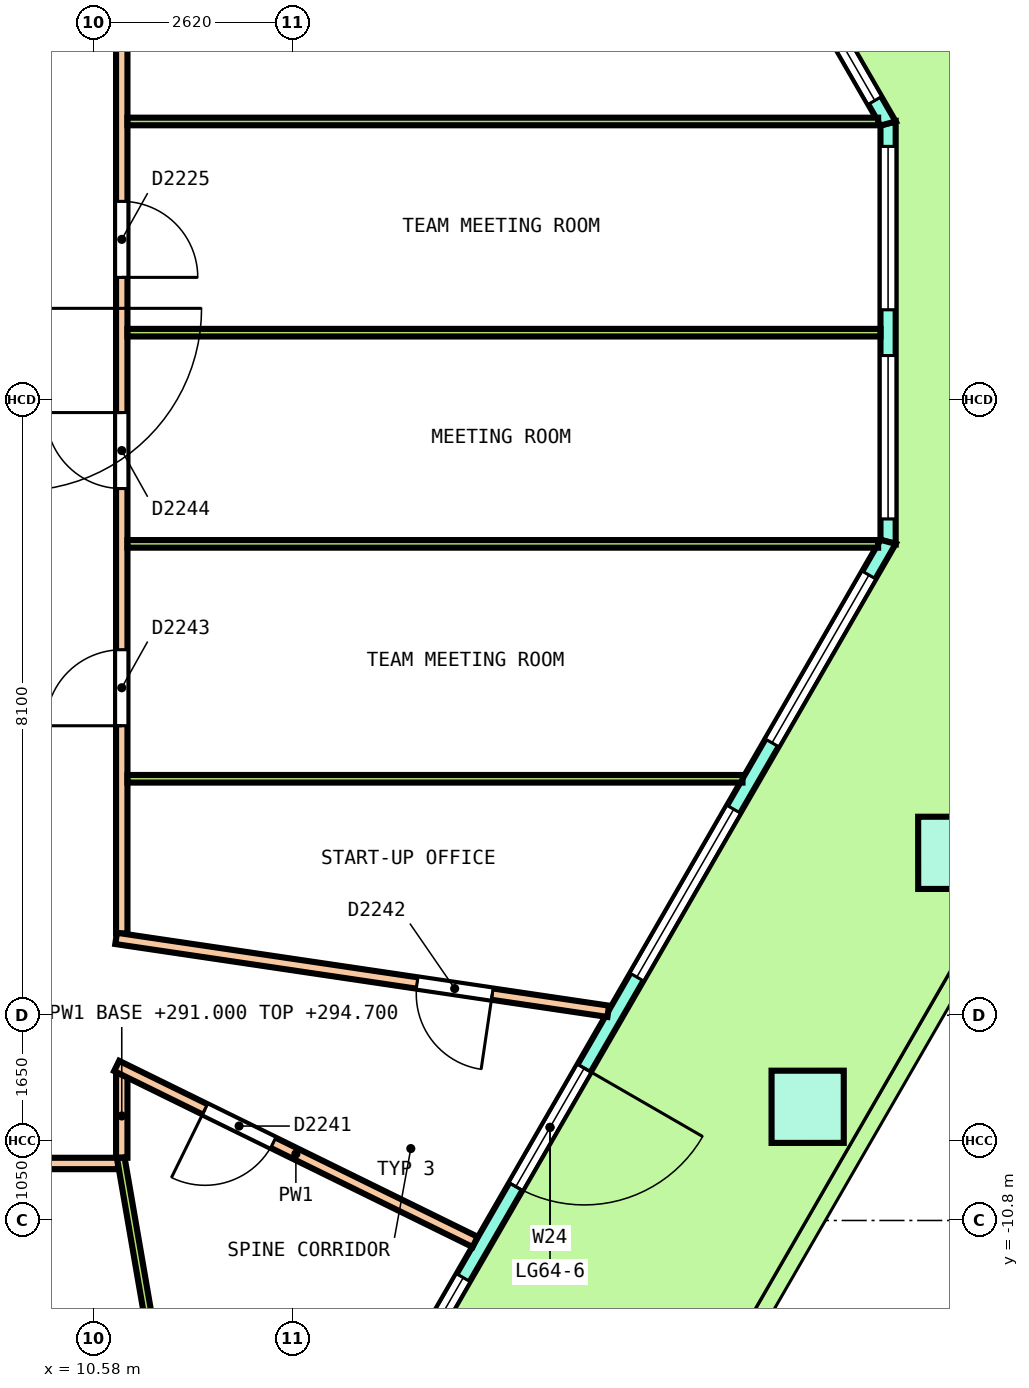
"""IFC4 building model, lengths in metres.
Left out: names, types, materials, properties, quantities, classifications, styles, units other than length and angle.
Written with IfcOpenShell. Run it as: python <this file> out.ifc"""

import sys

from ifc_helpers import new_model, si_unit, direction, frame, frame_2d, origin, origin_2d, place, context, subcontext, project, spatial, polyline, rectangle, outline, extrude, element, fill, save


model = new_model("IFC4")
c1 = context("Model", 3, precision=1e-05, world=origin(), true_north=direction((0.0, 1.0)))
c2 = subcontext(c1, "Body", "Model", "MODEL_VIEW")
j1 = project(units=[si_unit("LENGTHUNIT", "METRE"), si_unit("PLANEANGLEUNIT", "RADIAN")], contexts=[c1])
p1 = place(None, origin())
s1 = spatial("IfcSite", under=j1, at=p1, CompositionType="ELEMENT")
p2 = place(p1, origin())
s2 = spatial("IfcBuilding", under=s1, at=p2, CompositionType="ELEMENT")
p3 = place(p2, frame((0.0, 0.0, 291.0)))
s3 = spatial("IfcBuildingStorey", under=s2, at=p3, CompositionType="ELEMENT", Elevation=291.0)
p4 = place(p3, frame((19.974, -9.304, 0.0), z_axis=(0.003611945175, 0.00628746012, 0.999973710503), x_axis=(0.497890394796, 0.867209649664, -0.007251089524)))
e1 = element("IfcColumn", 1, at=p4, inside=s3, PredefinedType="COLUMN", context=c2, shape_type="SweptSolid", body=[
    extrude(rectangle(XDim=0.95, YDim=0.95, at=origin_2d()), origin(), (0.0, 0.0, 1.0), 3.65),
])
p5 = place(p3, frame((21.903, -5.963, 0.0), z_axis=(0.010900423214, 0.018858400897, 0.999762742599), x_axis=(0.499728924135, 0.865907930491, -0.021782063614)))
e2 = element("IfcColumn", 2, at=p5, inside=s3, PredefinedType="COLUMN", context=c2, shape_type="SweptSolid", body=[
    extrude(rectangle(XDim=0.95, YDim=0.95, at=origin_2d()), origin(), (0.0, 0.0, 1.0), 3.651),
])
p6 = place(p3, frame((21.032, -1.872, 0.0), z_axis=(0.0, 0.0, 1.0), x_axis=(0.0, 1.0, 0.0)))
e3 = element("IfcWall", 3, at=p6, inside=s3, PredefinedType="SOLIDWALL", context=c2, shape_type="SweptSolid", body=[
    extrude(outline(polyline([(-0.027, -0.1), (1.084, -0.1), (2.196, -0.1), (3.307, -0.1), (4.419, -0.1), (5.53, -0.1), (5.477, 0.1), (4.387, 0.1), (3.297, 0.1), (2.207, 0.1), (1.117, 0.1), (0.027, 0.1), (-0.027, -0.1)])), origin(), (0.0, 0.0, 1.0), 3.7),
])
p7 = place(p6, frame((0.301, 0.0, 0.1)))
e4 = element("IfcOpeningElement", 4, at=p7, cuts=e3, PredefinedType="OPENING", context=c2, shape_type="SweptSolid", body=[
    extrude(rectangle(XDim=2.15, YDim=2.75, at=frame_2d((1.075, 1.375))), frame((0.0, 0.11, 0.0), z_axis=(0.0, -1.0, 0.0), x_axis=(1.0, 0.0, 0.0)), (0.0, 0.0, 1.0), 0.22),
])
p8 = place(p6, frame((3.052, 0.0, 0.1)))
e5 = element("IfcOpeningElement", 5, at=p8, cuts=e3, PredefinedType="OPENING", context=c2, shape_type="SweptSolid", body=[
    extrude(rectangle(XDim=2.15, YDim=2.75, at=frame_2d((1.075, 1.375))), frame((0.0, 0.11, 0.0), z_axis=(0.0, -1.0, 0.0), x_axis=(1.0, 0.0, 0.0)), (0.0, 0.0, 1.0), 0.22),
])
p9 = place(p3, frame((21.032, 3.632, 0.0), z_axis=(0.0, 0.0, 1.0), x_axis=(-0.50000248076, 0.866023971512, 0.0)))
e6 = element("IfcWall", 6, at=p9, inside=s3, PredefinedType="SOLIDWALL", context=c2, shape_type="SweptSolid", body=[
    extrude(outline(polyline([(-0.027, -0.1), (1.03, -0.1), (2.087, -0.1), (3.144, -0.1), (4.2, -0.1), (5.257, -0.1), (6.314, -0.1), (7.371, -0.1), (8.428, -0.1), (9.484, -0.1), (10.541, -0.1), (11.598, -0.1), (12.655, -0.1), (13.712, -0.1), (14.769, -0.1), (14.715, 0.1), (13.666, 0.1), (12.616, 0.1), (11.567, 0.1), (10.518, 0.1), (9.469, 0.1), (8.42, 0.1), (7.371, 0.1), (6.322, 0.1), (5.272, 0.1), (4.223, 0.1), (3.174, 0.1), (2.125, 0.1), (1.076, 0.1), (0.027, 0.1), (-0.027, -0.1)])), origin(), (0.0, 0.0, 1.0), 3.7),
])
p10 = place(p9, frame((0.349, 0.0, 0.1)))
e7 = element("IfcOpeningElement", 7, at=p10, cuts=e6, PredefinedType="OPENING", context=c2, shape_type="SweptSolid", body=[
    extrude(rectangle(XDim=2.25, YDim=2.75, at=frame_2d((1.125, 1.375))), frame((0.0, 0.11, 0.0), z_axis=(0.0, -1.0, 0.0), x_axis=(1.0, 0.0, 0.0)), (0.0, 0.0, 1.0), 0.22),
])
p11 = place(p9, frame((3.298, 0.0, 0.1)))
e8 = element("IfcOpeningElement", 8, at=p11, cuts=e6, PredefinedType="OPENING", context=c2, shape_type="SweptSolid", body=[
    extrude(rectangle(XDim=2.25, YDim=2.75, at=frame_2d((1.125, 1.375))), frame((0.0, 0.11, 0.0), z_axis=(0.0, -1.0, 0.0), x_axis=(1.0, 0.0, 0.0)), (0.0, 0.0, 1.0), 0.22),
])
p12 = place(p9, frame((6.471, 0.0, 0.0)))
e9 = element("IfcOpeningElement", 9, at=p12, cuts=e6, PredefinedType="OPENING", context=c2, shape_type="SweptSolid", body=[
    extrude(rectangle(XDim=1.8, YDim=2.4, at=frame_2d((0.9, 1.2))), frame((0.0, 0.11, 0.0), z_axis=(0.0, -1.0, 0.0), x_axis=(1.0, 0.0, 0.0)), (0.0, 0.0, 1.0), 0.22),
])
p13 = place(p9, frame((6.471, 0.0, 2.55)))
e10 = element("IfcOpeningElement", 10, at=p13, cuts=e6, PredefinedType="OPENING", context=c2, shape_type="SweptSolid", body=[
    extrude(rectangle(XDim=1.8, YDim=0.3, at=frame_2d((0.9, 0.15))), frame((0.0, 0.11, 0.0), z_axis=(0.0, -1.0, 0.0), x_axis=(1.0, 0.0, 0.0)), (0.0, 0.0, 1.0), 0.22),
])
p14 = place(p9, frame((9.194, 0.0, 0.1)))
e11 = element("IfcOpeningElement", 11, at=p14, cuts=e6, PredefinedType="OPENING", context=c2, shape_type="SweptSolid", body=[
    extrude(rectangle(XDim=2.25, YDim=2.75, at=frame_2d((1.125, 1.375))), frame((0.0, 0.11, 0.0), z_axis=(0.0, -1.0, 0.0), x_axis=(1.0, 0.0, 0.0)), (0.0, 0.0, 1.0), 0.22),
])
p15 = place(p9, frame((12.143, 0.0, 0.1)))
e12 = element("IfcOpeningElement", 12, at=p15, cuts=e6, PredefinedType="OPENING", context=c2, shape_type="SweptSolid", body=[
    extrude(rectangle(XDim=2.25, YDim=2.75, at=frame_2d((1.125, 1.375))), frame((0.0, 0.11, 0.0), z_axis=(0.0, -1.0, 0.0), x_axis=(1.0, 0.0, 0.0)), (0.0, 0.0, 1.0), 0.22),
])
p16 = place(p3, frame((12.137, -17.278, 0.0), z_axis=(0.0, 0.0, 1.0), x_axis=(0.499992911004, 0.86602949658, 0.0)))
e13 = element("IfcWall", 13, at=p16, inside=s3, PredefinedType="SOLIDWALL", context=c2, shape_type="SweptSolid", body=[
    extrude(outline(polyline([(-0.027, -0.1), (1.023, -0.1), (2.072, -0.1), (3.122, -0.1), (4.172, -0.1), (5.221, -0.1), (6.271, -0.1), (7.321, -0.1), (8.37, -0.1), (9.42, -0.1), (10.469, -0.1), (11.519, -0.1), (12.569, -0.1), (13.618, -0.1), (14.668, -0.1), (15.718, -0.1), (16.767, -0.1), (17.817, -0.1), (17.763, 0.1), (16.72, 0.1), (15.676, 0.1), (14.633, 0.1), (13.59, 0.1), (12.546, 0.1), (11.503, 0.1), (10.46, 0.1), (9.417, 0.1), (8.373, 0.1), (7.33, 0.1), (6.287, 0.1), (5.243, 0.1), (4.2, 0.1), (3.157, 0.1), (2.114, 0.1), (1.07, 0.1), (0.027, 0.1), (-0.027, -0.1)])), origin(), (0.0, 0.0, 1.0), 3.7),
])
p17 = place(p16, frame((0.504, 0.0, 0.1)))
e14 = element("IfcOpeningElement", 14, at=p17, cuts=e13, PredefinedType="OPENING", context=c2, shape_type="SweptSolid", body=[
    extrude(rectangle(XDim=2.55, YDim=2.75, at=frame_2d((1.275, 1.375))), frame((0.0, 0.11, 0.0), z_axis=(0.0, -1.0, 0.0), x_axis=(1.0, 0.0, 0.0)), (0.0, 0.0, 1.0), 0.22),
])
p18 = place(p16, frame((4.062, 0.0, 0.1)))
e15 = element("IfcOpeningElement", 15, at=p18, cuts=e13, PredefinedType="OPENING", context=c2, shape_type="SweptSolid", body=[
    extrude(rectangle(XDim=2.55, YDim=2.75, at=frame_2d((1.275, 1.375))), frame((0.0, 0.11, 0.0), z_axis=(0.0, -1.0, 0.0), x_axis=(1.0, 0.0, 0.0)), (0.0, 0.0, 1.0), 0.22),
])
p19 = place(p16, frame((7.995, 0.0, 0.0)))
e16 = element("IfcOpeningElement", 16, at=p19, cuts=e13, PredefinedType="OPENING", context=c2, shape_type="SweptSolid", body=[
    extrude(rectangle(XDim=1.8, YDim=2.4, at=frame_2d((0.9, 1.2))), frame((0.0, 0.11, 0.0), z_axis=(0.0, -1.0, 0.0), x_axis=(1.0, 0.0, 0.0)), (0.0, 0.0, 1.0), 0.22),
])
p20 = place(p16, frame((7.995, 0.0, 2.55)))
e17 = element("IfcOpeningElement", 17, at=p20, cuts=e13, PredefinedType="OPENING", context=c2, shape_type="SweptSolid", body=[
    extrude(rectangle(XDim=1.8, YDim=0.3, at=frame_2d((0.9, 0.15))), frame((0.0, 0.11, 0.0), z_axis=(0.0, -1.0, 0.0), x_axis=(1.0, 0.0, 0.0)), (0.0, 0.0, 1.0), 0.22),
])
p21 = place(p16, frame((11.178, 0.0, 0.1)))
e18 = element("IfcOpeningElement", 18, at=p21, cuts=e13, PredefinedType="OPENING", context=c2, shape_type="SweptSolid", body=[
    extrude(rectangle(XDim=2.55, YDim=2.75, at=frame_2d((1.275, 1.375))), frame((0.0, 0.11, 0.0), z_axis=(0.0, -1.0, 0.0), x_axis=(1.0, 0.0, 0.0)), (0.0, 0.0, 1.0), 0.22),
])
p22 = place(p16, frame((14.736, 0.0, 0.1)))
e19 = element("IfcOpeningElement", 19, at=p22, cuts=e13, PredefinedType="OPENING", context=c2, shape_type="SweptSolid", body=[
    extrude(rectangle(XDim=2.55, YDim=2.75, at=frame_2d((1.275, 1.375))), frame((0.0, 0.11, 0.0), z_axis=(0.0, -1.0, 0.0), x_axis=(1.0, 0.0, 0.0)), (0.0, 0.0, 1.0), 0.22),
])
p23 = place(p3, frame((10.95, -9.975, 0.0), z_axis=(0.0, 0.0, 1.0), x_axis=(0.0, 1.0, 0.0)))
e20 = element("IfcWall", 20, at=p23, inside=s3, PredefinedType="PARTITIONING", context=c2, shape_type="SweptSolid", body=[
    extrude(rectangle(XDim=1.1, YDim=0.15, at=frame_2d((0.55, 0.0))), origin(), (0.0, 0.0, 1.0), 3.7),
])
p24 = place(p3, frame((10.95, -7.025, 0.0), z_axis=(0.0, 0.0, 1.0), x_axis=(0.0, 1.0, 0.0)))
e21 = element("IfcWall", 21, at=p24, inside=s3, PredefinedType="PARTITIONING", context=c2, shape_type="SweptSolid", body=[
    extrude(rectangle(XDim=17.0, YDim=0.15, at=frame_2d((8.5, 0.0))), origin(), (0.0, 0.0, 1.0), 2.9),
])
p25 = place(p24, frame((8.632, 0.0, 0.0)))
e22 = element("IfcOpeningElement", 22, at=p25, cuts=e21, PredefinedType="OPENING", context=c2, shape_type="SweptSolid", body=[
    extrude(rectangle(XDim=1.0, YDim=2.1, at=frame_2d((0.5, 1.05))), frame((0.0, 0.085, 0.0), z_axis=(0.0, -1.0, 0.0), x_axis=(1.0, 0.0, 0.0)), (0.0, 0.0, 1.0), 0.17),
])
p26 = place(p24, frame((12.605, 0.0, 0.0)))
e23 = element("IfcOpeningElement", 23, at=p26, cuts=e21, PredefinedType="OPENING", context=c2, shape_type="SweptSolid", body=[
    extrude(rectangle(XDim=1.2, YDim=2.1, at=frame_2d((0.6, 1.05))), frame((0.0, 0.085, 0.0), z_axis=(0.0, -1.0, 0.0), x_axis=(1.0, 0.0, 0.0)), (0.0, 0.0, 1.0), 0.17),
])
p27 = place(p24, frame((2.733, 0.0, 0.0)))
e24 = element("IfcOpeningElement", 24, at=p27, cuts=e21, PredefinedType="OPENING", context=c2, shape_type="SweptSolid", body=[
    extrude(rectangle(XDim=1.0, YDim=2.1, at=frame_2d((0.5, 1.05))), frame((0.0, 0.085, 0.0), z_axis=(0.0, -1.0, 0.0), x_axis=(1.0, 0.0, 0.0)), (0.0, 0.0, 1.0), 0.17),
])
p28 = place(p24, frame((5.854, 0.0, 0.0)))
e25 = element("IfcOpeningElement", 25, at=p28, cuts=e21, PredefinedType="OPENING", context=c2, shape_type="SweptSolid", body=[
    extrude(rectangle(XDim=1.0, YDim=2.1, at=frame_2d((0.5, 1.05))), frame((0.0, 0.085, 0.0), z_axis=(0.0, -1.0, 0.0), x_axis=(1.0, 0.0, 0.0)), (0.0, 0.0, 1.0), 0.17),
])
p29 = place(p3, frame((-10.9, -10.05, 0.0), z_axis=(0.0, 0.0, 1.0), x_axis=(1.0, 0.0, 0.0)))
e26 = element("IfcWall", 26, at=p29, inside=s3, PredefinedType="PARTITIONING", context=c2, shape_type="SweptSolid", body=[
    extrude(rectangle(XDim=21.8, YDim=0.15, at=frame_2d((10.9, 0.0))), origin(), (0.0, 0.0, 1.0), 2.9),
])
p30 = place(p29, frame((3.759, 0.0, 0.0)))
e27 = element("IfcOpeningElement", 27, at=p30, cuts=e26, PredefinedType="OPENING", context=c2, shape_type="SweptSolid", body=[
    extrude(rectangle(XDim=1.2, YDim=2.1, at=frame_2d((0.6, 1.05))), frame((0.0, 0.085, 0.0), z_axis=(0.0, -1.0, 0.0), x_axis=(1.0, 0.0, 0.0)), (0.0, 0.0, 1.0), 0.17),
])
p31 = place(p29, frame((11.477, 0.0, 0.0)))
e28 = element("IfcOpeningElement", 28, at=p31, cuts=e26, PredefinedType="OPENING", context=c2, shape_type="SweptSolid", body=[
    extrude(rectangle(XDim=1.0, YDim=2.1, at=frame_2d((0.5, 1.05))), frame((0.0, 0.085, 0.0), z_axis=(0.0, -1.0, 0.0), x_axis=(1.0, 0.0, 0.0)), (0.0, 0.0, 1.0), 0.17),
])
p32 = place(p29, frame((16.633, 0.0, 0.0)))
e29 = element("IfcOpeningElement", 29, at=p32, cuts=e26, PredefinedType="OPENING", context=c2, shape_type="SweptSolid", body=[
    extrude(rectangle(XDim=1.0, YDim=2.1, at=frame_2d((0.5, 1.05))), frame((0.0, 0.085, 0.0), z_axis=(0.0, -1.0, 0.0), x_axis=(1.0, 0.0, 0.0)), (0.0, 0.0, 1.0), 0.17),
])
p33 = place(p29, frame((19.107, 0.0, 0.0)))
e30 = element("IfcOpeningElement", 30, at=p33, cuts=e26, PredefinedType="OPENING", context=c2, shape_type="SweptSolid", body=[
    extrude(rectangle(XDim=1.0, YDim=2.1, at=frame_2d((0.5, 1.05))), frame((0.0, 0.085, 0.0), z_axis=(0.0, -1.0, 0.0), x_axis=(1.0, 0.0, 0.0)), (0.0, 0.0, 1.0), 0.17),
])
p34 = place(p3, frame((10.883, -8.767, 0.0), z_axis=(0.0, 0.0, 1.0), x_axis=(0.897683987508, -0.440639828625, 0.0)))
e31 = element("IfcWall", 31, at=p34, inside=s3, PredefinedType="PARTITIONING", context=c2, shape_type="SweptSolid", body=[
    extrude(rectangle(XDim=5.254, YDim=0.15, at=frame_2d((2.627, 0.0))), origin(), (0.0, 0.0, 1.0), 2.9),
])
p35 = place(p34, frame((1.295, 0.0, 0.0)))
e32 = element("IfcOpeningElement", 32, at=p35, cuts=e31, PredefinedType="OPENING", context=c2, shape_type="SweptSolid", body=[
    extrude(rectangle(XDim=1.0, YDim=2.1, at=frame_2d((0.5, 1.05))), frame((0.0, 0.085, 0.0), z_axis=(0.0, -1.0, 0.0), x_axis=(1.0, 0.0, 0.0)), (0.0, 0.0, 1.0), 0.17),
])
p36 = place(p3, frame((10.876, -7.089, 0.0), z_axis=(0.0, 0.0, 1.0), x_axis=(0.989208268324, -0.146516217118, 0.0)))
e33 = element("IfcWall", 33, at=p36, inside=s3, PredefinedType="PARTITIONING", context=c2, shape_type="SweptSolid", body=[
    extrude(rectangle(XDim=6.545, YDim=0.15, at=frame_2d((3.272, 0.0))), origin(), (0.0, 0.0, 1.0), 2.9),
])
p37 = place(p36, frame((4.003, 0.0, 0.0)))
e34 = element("IfcOpeningElement", 34, at=p37, cuts=e33, PredefinedType="OPENING", context=c2, shape_type="SweptSolid", body=[
    extrude(rectangle(XDim=1.0, YDim=2.1, at=frame_2d((0.5, 1.05))), frame((0.0, 0.085, 0.0), z_axis=(0.0, -1.0, 0.0), x_axis=(1.0, 0.0, 0.0)), (0.0, 0.0, 1.0), 0.17),
])
p38 = place(p3, frame((11.025, 3.658, 0.0), z_axis=(0.0, 0.0, 1.0), x_axis=(1.0, 0.0, 0.0)))
e35 = element("IfcWall", 35, at=p38, inside=s3, PredefinedType="PARTITIONING", context=c2, shape_type="SweptSolid", body=[
    extrude(rectangle(XDim=9.876, YDim=0.1, at=frame_2d((4.938, 0.0))), origin(), (0.0, 0.0, 1.0), 2.9),
])
p39 = place(p3, frame((11.025, 0.88, 0.0), z_axis=(0.0, 0.0, 1.0), x_axis=(1.0, 0.0, 0.0)))
e36 = element("IfcWall", 36, at=p39, inside=s3, PredefinedType="PARTITIONING", context=c2, shape_type="SweptSolid", body=[
    extrude(rectangle(XDim=9.907, YDim=0.1, at=frame_2d((4.954, 0.0))), origin(), (0.0, 0.0, 1.0), 2.9),
])
p40 = place(p3, frame((11.025, -1.899, 0.0), z_axis=(0.0, 0.0, 1.0), x_axis=(1.0, 0.0, 0.0)))
e37 = element("IfcWall", 37, at=p40, inside=s3, PredefinedType="PARTITIONING", context=c2, shape_type="SweptSolid", body=[
    extrude(rectangle(XDim=9.876, YDim=0.1, at=frame_2d((4.938, 0.0))), origin(), (0.0, 0.0, 1.0), 2.9),
])
p41 = place(p3, frame((11.025, -4.989, 0.0), z_axis=(0.0, 0.0, 1.0), x_axis=(1.0, 0.0, 0.0)))
e38 = element("IfcWall", 38, at=p41, inside=s3, PredefinedType="PARTITIONING", context=c2, shape_type="SweptSolid", body=[
    extrude(rectangle(XDim=8.092, YDim=0.1, at=frame_2d((4.046, 0.0))), origin(), (0.0, 0.0, 1.0), 2.9),
])
p42 = place(p3, frame((10.937, -9.976, 0.0), z_axis=(0.0, 0.0, 1.0), x_axis=(0.170071067824, -0.985431799715, 0.0)))
e39 = element("IfcWall", 39, at=p42, inside=s3, PredefinedType="PARTITIONING", context=c2, shape_type="SweptSolid", body=[
    extrude(rectangle(XDim=7.172, YDim=0.1, at=frame_2d((3.586, 0.0))), origin(), (0.0, 0.0, 1.0), 2.9),
])
p43 = place(p7, origin())
e40 = element("IfcWindow", 40, at=p43, inside=s3, PartitioningType="SINGLE_PANEL", PredefinedType="WINDOW", context=c2, shape_type="SweptSolid", body=[
    extrude(rectangle(XDim=2.15, YDim=2.75, at=frame_2d((1.075, 1.375))), frame((0.0, 0.03, 0.0), z_axis=(0.0, -1.0, 0.0), x_axis=(1.0, 0.0, 0.0)), (0.0, 0.0, 1.0), 0.06),
])
fill(e4, e40)
p44 = place(p8, origin())
e41 = element("IfcWindow", 41, at=p44, inside=s3, PartitioningType="SINGLE_PANEL", PredefinedType="WINDOW", context=c2, shape_type="SweptSolid", body=[
    extrude(rectangle(XDim=2.15, YDim=2.75, at=frame_2d((1.075, 1.375))), frame((0.0, 0.03, 0.0), z_axis=(0.0, -1.0, 0.0), x_axis=(1.0, 0.0, 0.0)), (0.0, 0.0, 1.0), 0.06),
])
fill(e5, e41)
p45 = place(p10, origin())
e42 = element("IfcWindow", 42, at=p45, inside=s3, PartitioningType="SINGLE_PANEL", PredefinedType="WINDOW", context=c2, shape_type="SweptSolid", body=[
    extrude(rectangle(XDim=2.25, YDim=2.75, at=frame_2d((1.125, 1.375))), frame((0.0, 0.03, 0.0), z_axis=(0.0, -1.0, 0.0), x_axis=(1.0, 0.0, 0.0)), (0.0, 0.0, 1.0), 0.06),
])
fill(e7, e42)
p46 = place(p18, origin())
e43 = element("IfcWindow", 43, at=p46, inside=s3, PartitioningType="SINGLE_PANEL", PredefinedType="WINDOW", context=c2, shape_type="SweptSolid", body=[
    extrude(rectangle(XDim=2.55, YDim=2.75, at=frame_2d((1.275, 1.375))), frame((0.0, 0.03, 0.0), z_axis=(0.0, -1.0, 0.0), x_axis=(1.0, 0.0, 0.0)), (0.0, 0.0, 1.0), 0.06),
])
fill(e15, e43)
p47 = place(p19, origin())
e44 = element("IfcDoor", 44, at=p47, inside=s3, OperationType="DOUBLE_DOOR_SINGLE_SWING", PredefinedType="DOOR", context=c2, shape_type="SweptSolid", body=[
    extrude(rectangle(XDim=1.8, YDim=2.4, at=frame_2d((0.9, 1.2))), frame((0.0, 0.025, 0.0), z_axis=(0.0, -1.0, 0.0), x_axis=(1.0, 0.0, 0.0)), (0.0, 0.0, 1.0), 0.05),
])
fill(e16, e44)
p48 = place(p20, origin())
e45 = element("IfcWindow", 45, at=p48, inside=s3, PartitioningType="SINGLE_PANEL", PredefinedType="WINDOW", context=c2, shape_type="SweptSolid", body=[
    extrude(rectangle(XDim=1.8, YDim=0.3, at=frame_2d((0.9, 0.15))), frame((0.0, 0.03, 0.0), z_axis=(0.0, -1.0, 0.0), x_axis=(1.0, 0.0, 0.0)), (0.0, 0.0, 1.0), 0.06),
])
fill(e17, e45)
p49 = place(p21, origin())
e46 = element("IfcWindow", 46, at=p49, inside=s3, PartitioningType="SINGLE_PANEL", PredefinedType="WINDOW", context=c2, shape_type="SweptSolid", body=[
    extrude(rectangle(XDim=2.55, YDim=2.75, at=frame_2d((1.275, 1.375))), frame((0.0, 0.03, 0.0), z_axis=(0.0, -1.0, 0.0), x_axis=(1.0, 0.0, 0.0)), (0.0, 0.0, 1.0), 0.06),
])
fill(e18, e46)
p50 = place(p22, origin())
e47 = element("IfcWindow", 47, at=p50, inside=s3, PartitioningType="SINGLE_PANEL", PredefinedType="WINDOW", context=c2, shape_type="SweptSolid", body=[
    extrude(rectangle(XDim=2.55, YDim=2.75, at=frame_2d((1.275, 1.375))), frame((0.0, 0.03, 0.0), z_axis=(0.0, -1.0, 0.0), x_axis=(1.0, 0.0, 0.0)), (0.0, 0.0, 1.0), 0.06),
])
fill(e19, e47)
p51 = place(p25, origin())
e48 = element("IfcDoor", 48, at=p51, inside=s3, OperationType="SINGLE_SWING_LEFT", PredefinedType="DOOR", context=c2, shape_type="SweptSolid", body=[
    extrude(rectangle(XDim=1.0, YDim=2.1, at=frame_2d((0.5, 1.05))), frame((0.0, 0.025, 0.0), z_axis=(0.0, -1.0, 0.0), x_axis=(1.0, 0.0, 0.0)), (0.0, 0.0, 1.0), 0.05),
])
fill(e22, e48)
p52 = place(p35, origin())
e49 = element("IfcDoor", 49, at=p52, inside=s3, OperationType="SINGLE_SWING_RIGHT", PredefinedType="DOOR", context=c2, shape_type="SweptSolid", body=[
    extrude(rectangle(XDim=1.0, YDim=2.1, at=frame_2d((0.5, 1.05))), frame((0.0, 0.025, 0.0), z_axis=(0.0, -1.0, 0.0), x_axis=(1.0, 0.0, 0.0)), (0.0, 0.0, 1.0), 0.05),
])
fill(e32, e49)
p53 = place(p37, origin())
e50 = element("IfcDoor", 50, at=p53, inside=s3, OperationType="SINGLE_SWING_LEFT", PredefinedType="DOOR", context=c2, shape_type="SweptSolid", body=[
    extrude(rectangle(XDim=1.0, YDim=2.1, at=frame_2d((0.5, 1.05))), frame((0.0, 0.025, 0.0), z_axis=(0.0, -1.0, 0.0), x_axis=(1.0, 0.0, 0.0)), (0.0, 0.0, 1.0), 0.05),
])
fill(e34, e50)
p54 = place(p27, origin())
e51 = element("IfcDoor", 51, at=p54, inside=s3, OperationType="SINGLE_SWING_RIGHT", PredefinedType="DOOR", context=c2, shape_type="SweptSolid", body=[
    extrude(rectangle(XDim=1.0, YDim=2.1, at=frame_2d((0.5, 1.05))), frame((0.0, 0.025, 0.0), z_axis=(0.0, -1.0, 0.0), x_axis=(1.0, 0.0, 0.0)), (0.0, 0.0, 1.0), 0.05),
])
fill(e24, e51)
p55 = place(p28, origin())
e52 = element("IfcDoor", 52, at=p55, inside=s3, OperationType="SINGLE_SWING_RIGHT", PredefinedType="DOOR", context=c2, shape_type="SweptSolid", body=[
    extrude(rectangle(XDim=1.0, YDim=2.1, at=frame_2d((0.5, 1.05))), frame((0.0, 0.025, 0.0), z_axis=(0.0, -1.0, 0.0), x_axis=(1.0, 0.0, 0.0)), (0.0, 0.0, 1.0), 0.05),
])
fill(e25, e52)
save(model, sys.argv[1])
